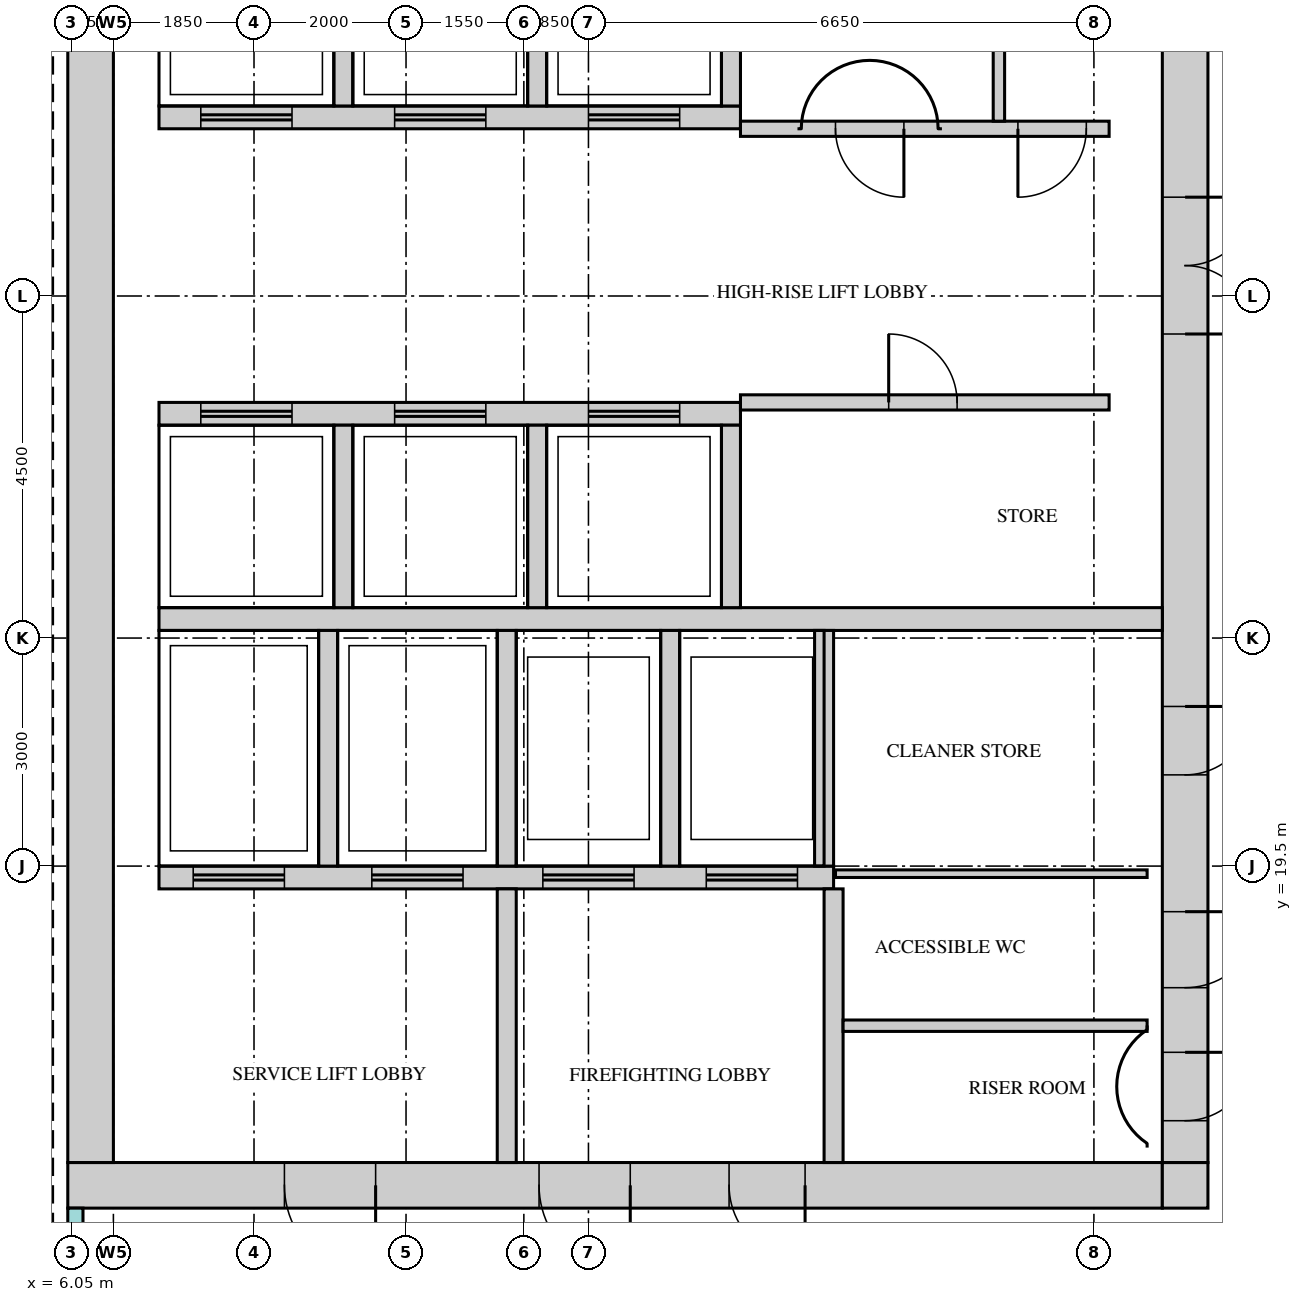
"""IFC4 building model, lengths in metres.
Left out: names, types, materials, properties, quantities, classifications, styles, units other than length and angle.
Written with IfcOpenShell. Run it as: python <this file> out.ifc"""

import sys

from ifc_helpers import new_model, si_unit, direction, frame, frame_2d, origin, place, context, subcontext, project, spatial, rectangle, extrude, source, transform, mapped, element, fill, save


model = new_model("IFC4")
c1 = context("Model", 3, precision=1e-05, world=origin(), true_north=direction((0.0, 1.0)))
c2 = subcontext(c1, "Body", "Model", "MODEL_VIEW")
j1 = project(units=[si_unit("LENGTHUNIT", "METRE"), si_unit("PLANEANGLEUNIT", "RADIAN")], contexts=[c1])
p1 = place(None, origin())
s1 = spatial("IfcSite", under=j1, at=p1, CompositionType="ELEMENT")
p2 = place(p1, origin())
s2 = spatial("IfcBuilding", under=s1, at=p2, CompositionType="ELEMENT")
p3 = place(p2, frame((0.0, 0.0, 286.2)))
s3 = spatial("IfcBuildingStorey", under=s2, at=p3, CompositionType="ELEMENT", Elevation=286.2)
m1 = source(origin(), c2, "Body", "SweptSolid", [
    extrude(rectangle(XDim=14.4, YDim=0.6, at=frame_2d((7.2, 0.0))), origin(), (0.0, 0.0, 1.0), 3.75),
])
p4 = place(p3, frame((6.0, 15.3, 0.0), z_axis=(0.0, 0.0, 1.0), x_axis=(1.0, 0.0, 0.0)))
e1 = element("IfcWall", 1, at=p4, inside=s3, PredefinedType="SHEAR", context=c2, shape_type="MappedRepresentation", body=[
    mapped(m1, transform((0.0, 0.0, 0.0))),
])
m2 = source(origin(), c2, "Body", "SweptSolid", [
    extrude(rectangle(XDim=1.2, YDim=2.1, at=frame_2d((0.6, 1.05))), frame((0.0, 0.31, 0.0), z_axis=(0.0, -1.0, 0.0), x_axis=(1.0, 0.0, 0.0)), (0.0, 0.0, 1.0), 0.62),
])
p5 = place(p4, frame((6.2, 0.0, 0.0)))
e2 = element("IfcOpeningElement", 2, at=p5, cuts=e1, PredefinedType="OPENING", context=c2, shape_type="MappedRepresentation", body=[
    mapped(m2, transform((0.0, 0.0, 0.0))),
])
p6 = place(p4, frame((2.85, 0.0, 0.0)))
e3 = element("IfcOpeningElement", 3, at=p6, cuts=e1, PredefinedType="OPENING", context=c2, shape_type="MappedRepresentation", body=[
    mapped(m2, transform((0.0, 0.0, 0.0))),
])
m3 = source(origin(), c2, "Body", "SweptSolid", [
    extrude(rectangle(XDim=1.0, YDim=2.1, at=frame_2d((0.5, 1.05))), frame((0.0, 0.31, 0.0), z_axis=(0.0, -1.0, 0.0), x_axis=(1.0, 0.0, 0.0)), (0.0, 0.0, 1.0), 0.62),
])
p7 = place(p4, frame((8.7, 0.0, 0.0)))
e4 = element("IfcOpeningElement", 4, at=p7, cuts=e1, PredefinedType="OPENING", context=c2, shape_type="MappedRepresentation", body=[
    mapped(m3, transform((0.0, 0.0, 0.0))),
])
m4 = source(origin(), c2, "Body", "SweptSolid", [
    extrude(rectangle(XDim=0.6, YDim=0.6, at=frame_2d((0.3, 0.0))), origin(), (0.0, 0.0, 1.0), 3.75),
])
p8 = place(p3, frame((20.4, 15.3, 0.0), z_axis=(0.0, 0.0, 1.0), x_axis=(1.0, 0.0, 0.0)))
e5 = element("IfcWall", 5, at=p8, inside=s3, PredefinedType="SHEAR", context=c2, shape_type="MappedRepresentation", body=[
    mapped(m4, transform((0.0, 0.0, 0.0))),
])
m5 = source(origin(), c2, "Body", "SweptSolid", [
    extrude(rectangle(XDim=22.8, YDim=0.6, at=frame_2d((11.4, 0.0))), origin(), (0.0, 0.0, 1.0), 3.75),
])
p9 = place(p3, frame((20.7, 15.6, 0.0), z_axis=(0.0, 0.0, 1.0), x_axis=(0.0, 1.0, 0.0)))
e6 = element("IfcWall", 6, at=p9, inside=s3, PredefinedType="SHEAR", context=c2, shape_type="MappedRepresentation", body=[
    mapped(m5, transform((0.0, 0.0, 0.0))),
])
m6 = source(origin(), c2, "Body", "SweptSolid", [
    extrude(rectangle(XDim=1.8, YDim=2.1, at=frame_2d((0.9, 1.05))), frame((0.0, 0.31, 0.0), z_axis=(0.0, -1.0, 0.0), x_axis=(1.0, 0.0, 0.0)), (0.0, 0.0, 1.0), 0.62),
])
p10 = place(p9, frame((10.9, 0.0, 0.0)))
e7 = element("IfcOpeningElement", 7, at=p10, cuts=e6, PredefinedType="OPENING", context=c2, shape_type="MappedRepresentation", body=[
    mapped(m6, transform((0.0, 0.0, 0.0))),
])
m7 = source(origin(), c2, "Body", "SweptSolid", [
    extrude(rectangle(XDim=0.9, YDim=2.1, at=frame_2d((0.45, 1.05))), frame((0.0, 0.31, 0.0), z_axis=(0.0, -1.0, 0.0), x_axis=(1.0, 0.0, 0.0)), (0.0, 0.0, 1.0), 0.62),
])
p11 = place(p9, frame((0.55, 0.0, 0.0)))
e8 = element("IfcOpeningElement", 8, at=p11, cuts=e6, PredefinedType="OPENING", context=c2, shape_type="MappedRepresentation", body=[
    mapped(m7, transform((0.0, 0.0, 0.0))),
])
p12 = place(p9, frame((2.3, 0.0, 0.0)))
e9 = element("IfcOpeningElement", 9, at=p12, cuts=e6, PredefinedType="OPENING", context=c2, shape_type="MappedRepresentation", body=[
    mapped(m3, transform((0.0, 0.0, 0.0))),
])
p13 = place(p9, frame((5.1, 0.0, 0.0)))
e10 = element("IfcOpeningElement", 10, at=p13, cuts=e6, PredefinedType="OPENING", context=c2, shape_type="MappedRepresentation", body=[
    mapped(m7, transform((0.0, 0.0, 0.0))),
])
p14 = place(p3, frame((6.3, 15.6, 0.0), z_axis=(0.0, 0.0, 1.0), x_axis=(0.0, 1.0, 0.0)))
e11 = element("IfcWall", 11, at=p14, inside=s3, PredefinedType="SHEAR", context=c2, shape_type="MappedRepresentation", body=[
    mapped(m5, transform((0.0, 0.0, 0.0))),
])
m8 = source(origin(), c2, "Body", "SweptSolid", [
    extrude(rectangle(XDim=13.2, YDim=0.3, at=frame_2d((6.6, 0.0))), origin(), (0.0, 0.0, 1.0), 3.75),
])
p15 = place(p3, frame((7.2, 22.75, 0.0), z_axis=(0.0, 0.0, 1.0), x_axis=(1.0, 0.0, 0.0)))
e12 = element("IfcWall", 12, at=p15, inside=s3, PredefinedType="STANDARD", context=c2, shape_type="MappedRepresentation", body=[
    mapped(m8, transform((0.0, 0.0, 0.0))),
])
m9 = source(origin(), c2, "Body", "SweptSolid", [
    extrude(rectangle(XDim=8.875, YDim=0.3, at=frame_2d((4.438, 0.0))), origin(), (0.0, 0.0, 1.0), 3.75),
])
p16 = place(p3, frame((7.2, 19.35, 0.0), z_axis=(0.0, 0.0, 1.0), x_axis=(1.0, 0.0, 0.0)))
e13 = element("IfcWall", 13, at=p16, inside=s3, PredefinedType="STANDARD", context=c2, shape_type="MappedRepresentation", body=[
    mapped(m9, transform((0.0, 0.0, 0.0))),
])
m10 = source(origin(), c2, "Body", "SweptSolid", [
    extrude(rectangle(XDim=1.2, YDim=2.1, at=frame_2d((0.6, 1.05))), frame((0.0, 0.16, 0.0), z_axis=(0.0, -1.0, 0.0), x_axis=(1.0, 0.0, 0.0)), (0.0, 0.0, 1.0), 0.32),
])
p17 = place(p16, frame((0.45, 0.0, 0.0)))
e14 = element("IfcOpeningElement", 14, at=p17, cuts=e13, PredefinedType="OPENING", context=c2, shape_type="MappedRepresentation", body=[
    mapped(m10, transform((0.0, 0.0, 0.0))),
])
p18 = place(p16, frame((2.8, 0.0, 0.0)))
e15 = element("IfcOpeningElement", 15, at=p18, cuts=e13, PredefinedType="OPENING", context=c2, shape_type="MappedRepresentation", body=[
    mapped(m10, transform((0.0, 0.0, 0.0))),
])
p19 = place(p16, frame((5.05, 0.0, 0.0)))
e16 = element("IfcOpeningElement", 16, at=p19, cuts=e13, PredefinedType="OPENING", context=c2, shape_type="MappedRepresentation", body=[
    mapped(m10, transform((0.0, 0.0, 0.0))),
])
p20 = place(p16, frame((7.2, 0.0, 0.0)))
e17 = element("IfcOpeningElement", 17, at=p20, cuts=e13, PredefinedType="OPENING", context=c2, shape_type="MappedRepresentation", body=[
    mapped(m10, transform((0.0, 0.0, 0.0))),
])
m11 = source(origin(), c2, "Body", "SweptSolid", [
    extrude(rectangle(XDim=7.65, YDim=0.3, at=frame_2d((3.825, 0.0))), origin(), (0.0, 0.0, 1.0), 3.75),
])
p21 = place(p3, frame((7.2, 29.35, 0.0), z_axis=(0.0, 0.0, 1.0), x_axis=(1.0, 0.0, 0.0)))
e18 = element("IfcWall", 18, at=p21, inside=s3, PredefinedType="STANDARD", context=c2, shape_type="MappedRepresentation", body=[
    mapped(m11, transform((0.0, 0.0, 0.0))),
])
p22 = place(p21, frame((0.55, 0.0, 0.0)))
e19 = element("IfcOpeningElement", 19, at=p22, cuts=e18, PredefinedType="OPENING", context=c2, shape_type="MappedRepresentation", body=[
    mapped(m10, transform((0.0, 0.0, 0.0))),
])
p23 = place(p21, frame((3.1, 0.0, 0.0)))
e20 = element("IfcOpeningElement", 20, at=p23, cuts=e18, PredefinedType="OPENING", context=c2, shape_type="MappedRepresentation", body=[
    mapped(m10, transform((0.0, 0.0, 0.0))),
])
p24 = place(p21, frame((5.65, 0.0, 0.0)))
e21 = element("IfcOpeningElement", 21, at=p24, cuts=e18, PredefinedType="OPENING", context=c2, shape_type="MappedRepresentation", body=[
    mapped(m10, transform((0.0, 0.0, 0.0))),
])
p25 = place(p3, frame((7.2, 25.45, 0.0), z_axis=(0.0, 0.0, 1.0), x_axis=(1.0, 0.0, 0.0)))
e22 = element("IfcWall", 22, at=p25, inside=s3, PredefinedType="STANDARD", context=c2, shape_type="MappedRepresentation", body=[
    mapped(m11, transform((0.0, 0.0, 0.0))),
])
p26 = place(p25, frame((0.55, 0.0, 0.0)))
e23 = element("IfcOpeningElement", 23, at=p26, cuts=e22, PredefinedType="OPENING", context=c2, shape_type="MappedRepresentation", body=[
    mapped(m10, transform((0.0, 0.0, 0.0))),
])
p27 = place(p25, frame((3.1, 0.0, 0.0)))
e24 = element("IfcOpeningElement", 24, at=p27, cuts=e22, PredefinedType="OPENING", context=c2, shape_type="MappedRepresentation", body=[
    mapped(m10, transform((0.0, 0.0, 0.0))),
])
p28 = place(p25, frame((5.65, 0.0, 0.0)))
e25 = element("IfcOpeningElement", 25, at=p28, cuts=e22, PredefinedType="OPENING", context=c2, shape_type="MappedRepresentation", body=[
    mapped(m10, transform((0.0, 0.0, 0.0))),
])
m12 = source(origin(), c2, "Body", "SweptSolid", [
    extrude(rectangle(XDim=3.1, YDim=0.25, at=frame_2d((1.55, 0.0))), origin(), (0.0, 0.0, 1.0), 3.75),
])
for number, where, z_axis, x_axis in (
    (26, (9.425, 19.5, 0.0), (0.0, 0.0, 1.0), (0.0, 1.0, 0.0)),
    (27, (11.775, 19.5, 0.0), (0.0, 0.0, 1.0), (0.0, 1.0, 0.0)),
    (28, (13.925, 19.5, 0.0), (0.0, 0.0, 1.0), (0.0, 1.0, 0.0)),
    (29, (15.95, 19.5, 0.0), (0.0, 0.0, 1.0), (0.0, 1.0, 0.0)),
):
    element("IfcWall", number, at=place(p3, frame(where, z_axis=z_axis, x_axis=x_axis)), inside=s3, PredefinedType="STANDARD", context=c2, shape_type="MappedRepresentation", body=[
        mapped(m12, transform((0.0, 0.0, 0.0))),
    ])
m13 = source(origin(), c2, "Body", "SweptSolid", [
    extrude(rectangle(XDim=2.4, YDim=0.25, at=frame_2d((1.2, 0.0))), origin(), (0.0, 0.0, 1.0), 3.75),
])
for number, where, z_axis, x_axis in (
    (30, (9.625, 29.5, 0.0), (0.0, 0.0, 1.0), (0.0, 1.0, 0.0)),
    (31, (12.175, 29.5, 0.0), (0.0, 0.0, 1.0), (0.0, 1.0, 0.0)),
    (32, (14.725, 29.5, 0.0), (0.0, 0.0, 1.0), (0.0, 1.0, 0.0)),
):
    element("IfcWall", number, at=place(p3, frame(where, z_axis=z_axis, x_axis=x_axis)), inside=s3, PredefinedType="STANDARD", context=c2, shape_type="MappedRepresentation", body=[
        mapped(m13, transform((0.0, 0.0, 0.0))),
    ])
m14 = source(origin(), c2, "Body", "SweptSolid", [
    extrude(rectangle(XDim=2.4, YDim=0.25, at=frame_2d((1.2, 0.0))), origin(), (0.0, 0.0, 1.0), 3.75),
])
for number, where, z_axis, x_axis in (
    (33, (9.625, 22.9, 0.0), (0.0, 0.0, 1.0), (0.0, 1.0, 0.0)),
    (34, (12.175, 22.9, 0.0), (0.0, 0.0, 1.0), (0.0, 1.0, 0.0)),
    (35, (14.725, 22.9, 0.0), (0.0, 0.0, 1.0), (0.0, 1.0, 0.0)),
):
    element("IfcWall", number, at=place(p3, frame(where, z_axis=z_axis, x_axis=x_axis)), inside=s3, PredefinedType="STANDARD", context=c2, shape_type="MappedRepresentation", body=[
        mapped(m14, transform((0.0, 0.0, 0.0))),
    ])
m15 = source(origin(), c2, "Body", "SweptSolid", [
    extrude(rectangle(XDim=3.6, YDim=0.25, at=frame_2d((1.8, 0.0))), origin(), (0.0, 0.0, 1.0), 3.75),
])
for number, where, z_axis, x_axis in (
    (36, (16.075, 15.6, 0.0), (0.0, 0.0, 1.0), (0.0, 1.0, 0.0)),
    (37, (11.775, 15.6, 0.0), (0.0, 0.0, 1.0), (0.0, 1.0, 0.0)),
):
    element("IfcWall", number, at=place(p3, frame(where, z_axis=z_axis, x_axis=x_axis)), inside=s3, PredefinedType="STANDARD", context=c2, shape_type="MappedRepresentation", body=[
        mapped(m15, transform((0.0, 0.0, 0.0))),
    ])
m16 = source(origin(), c2, "Body", "SweptSolid", [
    extrude(rectangle(XDim=4.0, YDim=0.15, at=frame_2d((2.0, 0.0))), origin(), (0.0, 0.0, 1.0), 3.8),
])
p29 = place(p3, frame((16.2, 17.4, 0.0), z_axis=(0.0, 0.0, 1.0), x_axis=(1.0, 0.0, 0.0)))
e38 = element("IfcWall", 38, at=p29, inside=s3, PredefinedType="PARTITIONING", context=c2, shape_type="MappedRepresentation", body=[
    mapped(m16, transform((0.0, 0.0, 0.0))),
])
m17 = source(origin(), c2, "Body", "SweptSolid", [
    extrude(rectangle(XDim=4.1, YDim=0.1, at=frame_2d((2.05, 0.0))), origin(), (0.0, 0.0, 1.0), 3.8),
])
p30 = place(p3, frame((16.1, 19.4, 0.0), z_axis=(0.0, 0.0, 1.0), x_axis=(1.0, 0.0, 0.0)))
e39 = element("IfcWall", 39, at=p30, inside=s3, PredefinedType="PARTITIONING", context=c2, shape_type="MappedRepresentation", body=[
    mapped(m17, transform((0.0, 0.0, 0.0))),
])
m18 = source(origin(), c2, "Body", "SweptSolid", [
    extrude(rectangle(XDim=4.85, YDim=0.2, at=frame_2d((2.425, 0.0))), origin(), (0.0, 0.0, 1.0), 3.8),
])
p31 = place(p3, frame((14.85, 25.6, 0.0), z_axis=(0.0, 0.0, 1.0), x_axis=(1.0, 0.0, 0.0)))
e40 = element("IfcWall", 40, at=p31, inside=s3, PredefinedType="PARTITIONING", context=c2, shape_type="MappedRepresentation", body=[
    mapped(m18, transform((0.0, 0.0, 0.0))),
])
m19 = source(origin(), c2, "Body", "SweptSolid", [
    extrude(rectangle(XDim=0.9, YDim=2.1, at=frame_2d((0.45, 1.05))), frame((0.0, 0.11, 0.0), z_axis=(0.0, -1.0, 0.0), x_axis=(1.0, 0.0, 0.0)), (0.0, 0.0, 1.0), 0.22),
])
p32 = place(p31, frame((1.95, 0.0, 0.0)))
e41 = element("IfcOpeningElement", 41, at=p32, cuts=e40, PredefinedType="OPENING", context=c2, shape_type="MappedRepresentation", body=[
    mapped(m19, transform((0.0, 0.0, 0.0))),
])
p33 = place(p3, frame((14.85, 29.2, 0.0), z_axis=(0.0, 0.0, 1.0), x_axis=(1.0, 0.0, 0.0)))
e42 = element("IfcWall", 42, at=p33, inside=s3, PredefinedType="PARTITIONING", context=c2, shape_type="MappedRepresentation", body=[
    mapped(m18, transform((0.0, 0.0, 0.0))),
])
p34 = place(p33, frame((1.25, 0.0, 0.0)))
e43 = element("IfcOpeningElement", 43, at=p34, cuts=e42, PredefinedType="OPENING", context=c2, shape_type="MappedRepresentation", body=[
    mapped(m19, transform((0.0, 0.0, 0.0))),
])
p35 = place(p33, frame((3.65, 0.0, 0.0)))
e44 = element("IfcOpeningElement", 44, at=p35, cuts=e42, PredefinedType="OPENING", context=c2, shape_type="MappedRepresentation", body=[
    mapped(m19, transform((0.0, 0.0, 0.0))),
])
m20 = source(origin(), c2, "Body", "SweptSolid", [
    extrude(rectangle(XDim=2.8, YDim=0.15, at=frame_2d((1.4, 0.0))), origin(), (0.0, 0.0, 1.0), 3.8),
])
p36 = place(p3, frame((18.25, 29.3, 0.0), z_axis=(0.0, 0.0, 1.0), x_axis=(0.0, 1.0, 0.0)))
e45 = element("IfcWall", 45, at=p36, inside=s3, PredefinedType="PARTITIONING", context=c2, shape_type="MappedRepresentation", body=[
    mapped(m20, transform((0.0, 0.0, 0.0))),
])
m21 = source(origin(), c2, "Body", "SweptSolid", [
    extrude(rectangle(XDim=0.9, YDim=2.1, at=frame_2d((0.45, 1.05))), frame((0.0, 0.025, 0.0), z_axis=(0.0, -1.0, 0.0), x_axis=(1.0, 0.0, 0.0)), (0.0, 0.0, 1.0), 0.05),
])
p37 = place(p32, origin())
e46 = element("IfcDoor", 46, at=p37, inside=s3, OperationType="SINGLE_SWING_RIGHT", PredefinedType="DOOR", context=c2, shape_type="MappedRepresentation", body=[
    mapped(m21, transform((0.0, 0.0, 0.0))),
])
fill(e41, e46)
p38 = place(p34, origin())
e47 = element("IfcDoor", 47, at=p38, inside=s3, OperationType="SINGLE_SWING_RIGHT", PredefinedType="DOOR", context=c2, shape_type="MappedRepresentation", body=[
    mapped(m21, transform((0.0, 0.0, 0.0))),
])
fill(e43, e47)
p39 = place(p35, origin())
e48 = element("IfcDoor", 48, at=p39, inside=s3, OperationType="SINGLE_SWING_LEFT", PredefinedType="DOOR", context=c2, shape_type="MappedRepresentation", body=[
    mapped(m21, transform((0.0, 0.0, 0.0))),
])
fill(e44, e48)
m22 = source(origin(), c2, "Body", "SweptSolid", [
    extrude(rectangle(XDim=1.8, YDim=2.1, at=frame_2d((0.9, 1.05))), frame((0.0, 0.25, 0.0), z_axis=(0.0, -1.0, 0.0), x_axis=(1.0, 0.0, 0.0)), (0.0, 0.0, 1.0), 0.5),
])
p40 = place(p10, origin())
e49 = element("IfcDoor", 49, at=p40, inside=s3, OperationType="DOUBLE_DOOR_SINGLE_SWING", PredefinedType="DOOR", context=c2, shape_type="MappedRepresentation", body=[
    mapped(m22, transform((0.0, 0.0, 0.0))),
])
fill(e7, e49)
m23 = source(origin(), c2, "Body", "SweptSolid", [
    extrude(rectangle(XDim=0.9, YDim=2.1, at=frame_2d((0.45, 1.05))), frame((0.0, 0.25, 0.0), z_axis=(0.0, -1.0, 0.0), x_axis=(1.0, 0.0, 0.0)), (0.0, 0.0, 1.0), 0.5),
])
p41 = place(p11, origin())
e50 = element("IfcDoor", 50, at=p41, inside=s3, OperationType="SINGLE_SWING_RIGHT", PredefinedType="DOOR", context=c2, shape_type="MappedRepresentation", body=[
    mapped(m23, transform((0.0, 0.0, 0.0))),
])
fill(e8, e50)
m24 = source(origin(), c2, "Body", "SweptSolid", [
    extrude(rectangle(XDim=1.0, YDim=2.1, at=frame_2d((0.5, 1.05))), frame((0.0, 0.25, 0.0), z_axis=(0.0, -1.0, 0.0), x_axis=(1.0, 0.0, 0.0)), (0.0, 0.0, 1.0), 0.5),
])
p42 = place(p12, origin())
e51 = element("IfcDoor", 51, at=p42, inside=s3, OperationType="SINGLE_SWING_RIGHT", PredefinedType="DOOR", context=c2, shape_type="MappedRepresentation", body=[
    mapped(m24, transform((0.0, 0.0, 0.0))),
])
fill(e9, e51)
p43 = place(p13, origin())
e52 = element("IfcDoor", 52, at=p43, inside=s3, OperationType="SINGLE_SWING_RIGHT", PredefinedType="DOOR", context=c2, shape_type="MappedRepresentation", body=[
    mapped(m23, transform((0.0, 0.0, 0.0))),
])
fill(e10, e52)
m25 = source(origin(), c2, "Body", "SweptSolid", [
    extrude(rectangle(XDim=1.2, YDim=2.1, at=frame_2d((0.6, 1.05))), frame((0.0, 0.25, 0.0), z_axis=(0.0, -1.0, 0.0), x_axis=(1.0, 0.0, 0.0)), (0.0, 0.0, 1.0), 0.5),
])
p44 = place(p5, origin())
e53 = element("IfcDoor", 53, at=p44, inside=s3, OperationType="SINGLE_SWING_RIGHT", PredefinedType="DOOR", context=c2, shape_type="MappedRepresentation", body=[
    mapped(m25, transform((0.0, 0.0, 0.0))),
])
fill(e2, e53)
p45 = place(p6, origin())
e54 = element("IfcDoor", 54, at=p45, inside=s3, OperationType="SINGLE_SWING_RIGHT", PredefinedType="DOOR", context=c2, shape_type="MappedRepresentation", body=[
    mapped(m25, transform((0.0, 0.0, 0.0))),
])
fill(e3, e54)
p46 = place(p7, origin())
e55 = element("IfcDoor", 55, at=p46, inside=s3, OperationType="SINGLE_SWING_RIGHT", PredefinedType="DOOR", context=c2, shape_type="MappedRepresentation", body=[
    mapped(m24, transform((0.0, 0.0, 0.0))),
])
fill(e4, e55)
m26 = source(origin(), c2, "Body", "SweptSolid", [
    extrude(rectangle(XDim=1.2, YDim=2.1, at=frame_2d((0.6, 1.05))), frame((0.0, 0.025, 0.0), z_axis=(0.0, -1.0, 0.0), x_axis=(1.0, 0.0, 0.0)), (0.0, 0.0, 1.0), 0.05),
])
p47 = place(p26, origin())
e56 = element("IfcDoor", 56, at=p47, inside=s3, OperationType="DOUBLE_DOOR_SLIDING", PredefinedType="DOOR", context=c2, shape_type="MappedRepresentation", body=[
    mapped(m26, transform((0.0, 0.0, 0.0))),
])
fill(e23, e56)
p48 = place(p27, origin())
e57 = element("IfcDoor", 57, at=p48, inside=s3, OperationType="DOUBLE_DOOR_SLIDING", PredefinedType="DOOR", context=c2, shape_type="MappedRepresentation", body=[
    mapped(m26, transform((0.0, 0.0, 0.0))),
])
fill(e24, e57)
p49 = place(p28, origin())
e58 = element("IfcDoor", 58, at=p49, inside=s3, OperationType="DOUBLE_DOOR_SLIDING", PredefinedType="DOOR", context=c2, shape_type="MappedRepresentation", body=[
    mapped(m26, transform((0.0, 0.0, 0.0))),
])
fill(e25, e58)
p50 = place(p22, origin())
e59 = element("IfcDoor", 59, at=p50, inside=s3, OperationType="DOUBLE_DOOR_SLIDING", PredefinedType="DOOR", context=c2, shape_type="MappedRepresentation", body=[
    mapped(m26, transform((0.0, 0.0, 0.0))),
])
fill(e19, e59)
p51 = place(p23, origin())
e60 = element("IfcDoor", 60, at=p51, inside=s3, OperationType="DOUBLE_DOOR_SLIDING", PredefinedType="DOOR", context=c2, shape_type="MappedRepresentation", body=[
    mapped(m26, transform((0.0, 0.0, 0.0))),
])
fill(e20, e60)
p52 = place(p24, origin())
e61 = element("IfcDoor", 61, at=p52, inside=s3, OperationType="DOUBLE_DOOR_SLIDING", PredefinedType="DOOR", context=c2, shape_type="MappedRepresentation", body=[
    mapped(m26, transform((0.0, 0.0, 0.0))),
])
fill(e21, e61)
p53 = place(p17, origin())
e62 = element("IfcDoor", 62, at=p53, inside=s3, OperationType="DOUBLE_DOOR_SLIDING", PredefinedType="DOOR", context=c2, shape_type="MappedRepresentation", body=[
    mapped(m26, transform((0.0, 0.0, 0.0))),
])
fill(e14, e62)
p54 = place(p18, origin())
e63 = element("IfcDoor", 63, at=p54, inside=s3, OperationType="DOUBLE_DOOR_SLIDING", PredefinedType="DOOR", context=c2, shape_type="MappedRepresentation", body=[
    mapped(m26, transform((0.0, 0.0, 0.0))),
])
fill(e15, e63)
p55 = place(p19, origin())
e64 = element("IfcDoor", 64, at=p55, inside=s3, OperationType="DOUBLE_DOOR_SLIDING", PredefinedType="DOOR", context=c2, shape_type="MappedRepresentation", body=[
    mapped(m26, transform((0.0, 0.0, 0.0))),
])
fill(e16, e64)
p56 = place(p20, origin())
e65 = element("IfcDoor", 65, at=p56, inside=s3, OperationType="DOUBLE_DOOR_SLIDING", PredefinedType="DOOR", context=c2, shape_type="MappedRepresentation", body=[
    mapped(m26, transform((0.0, 0.0, 0.0))),
])
fill(e17, e65)
save(model, sys.argv[1])
